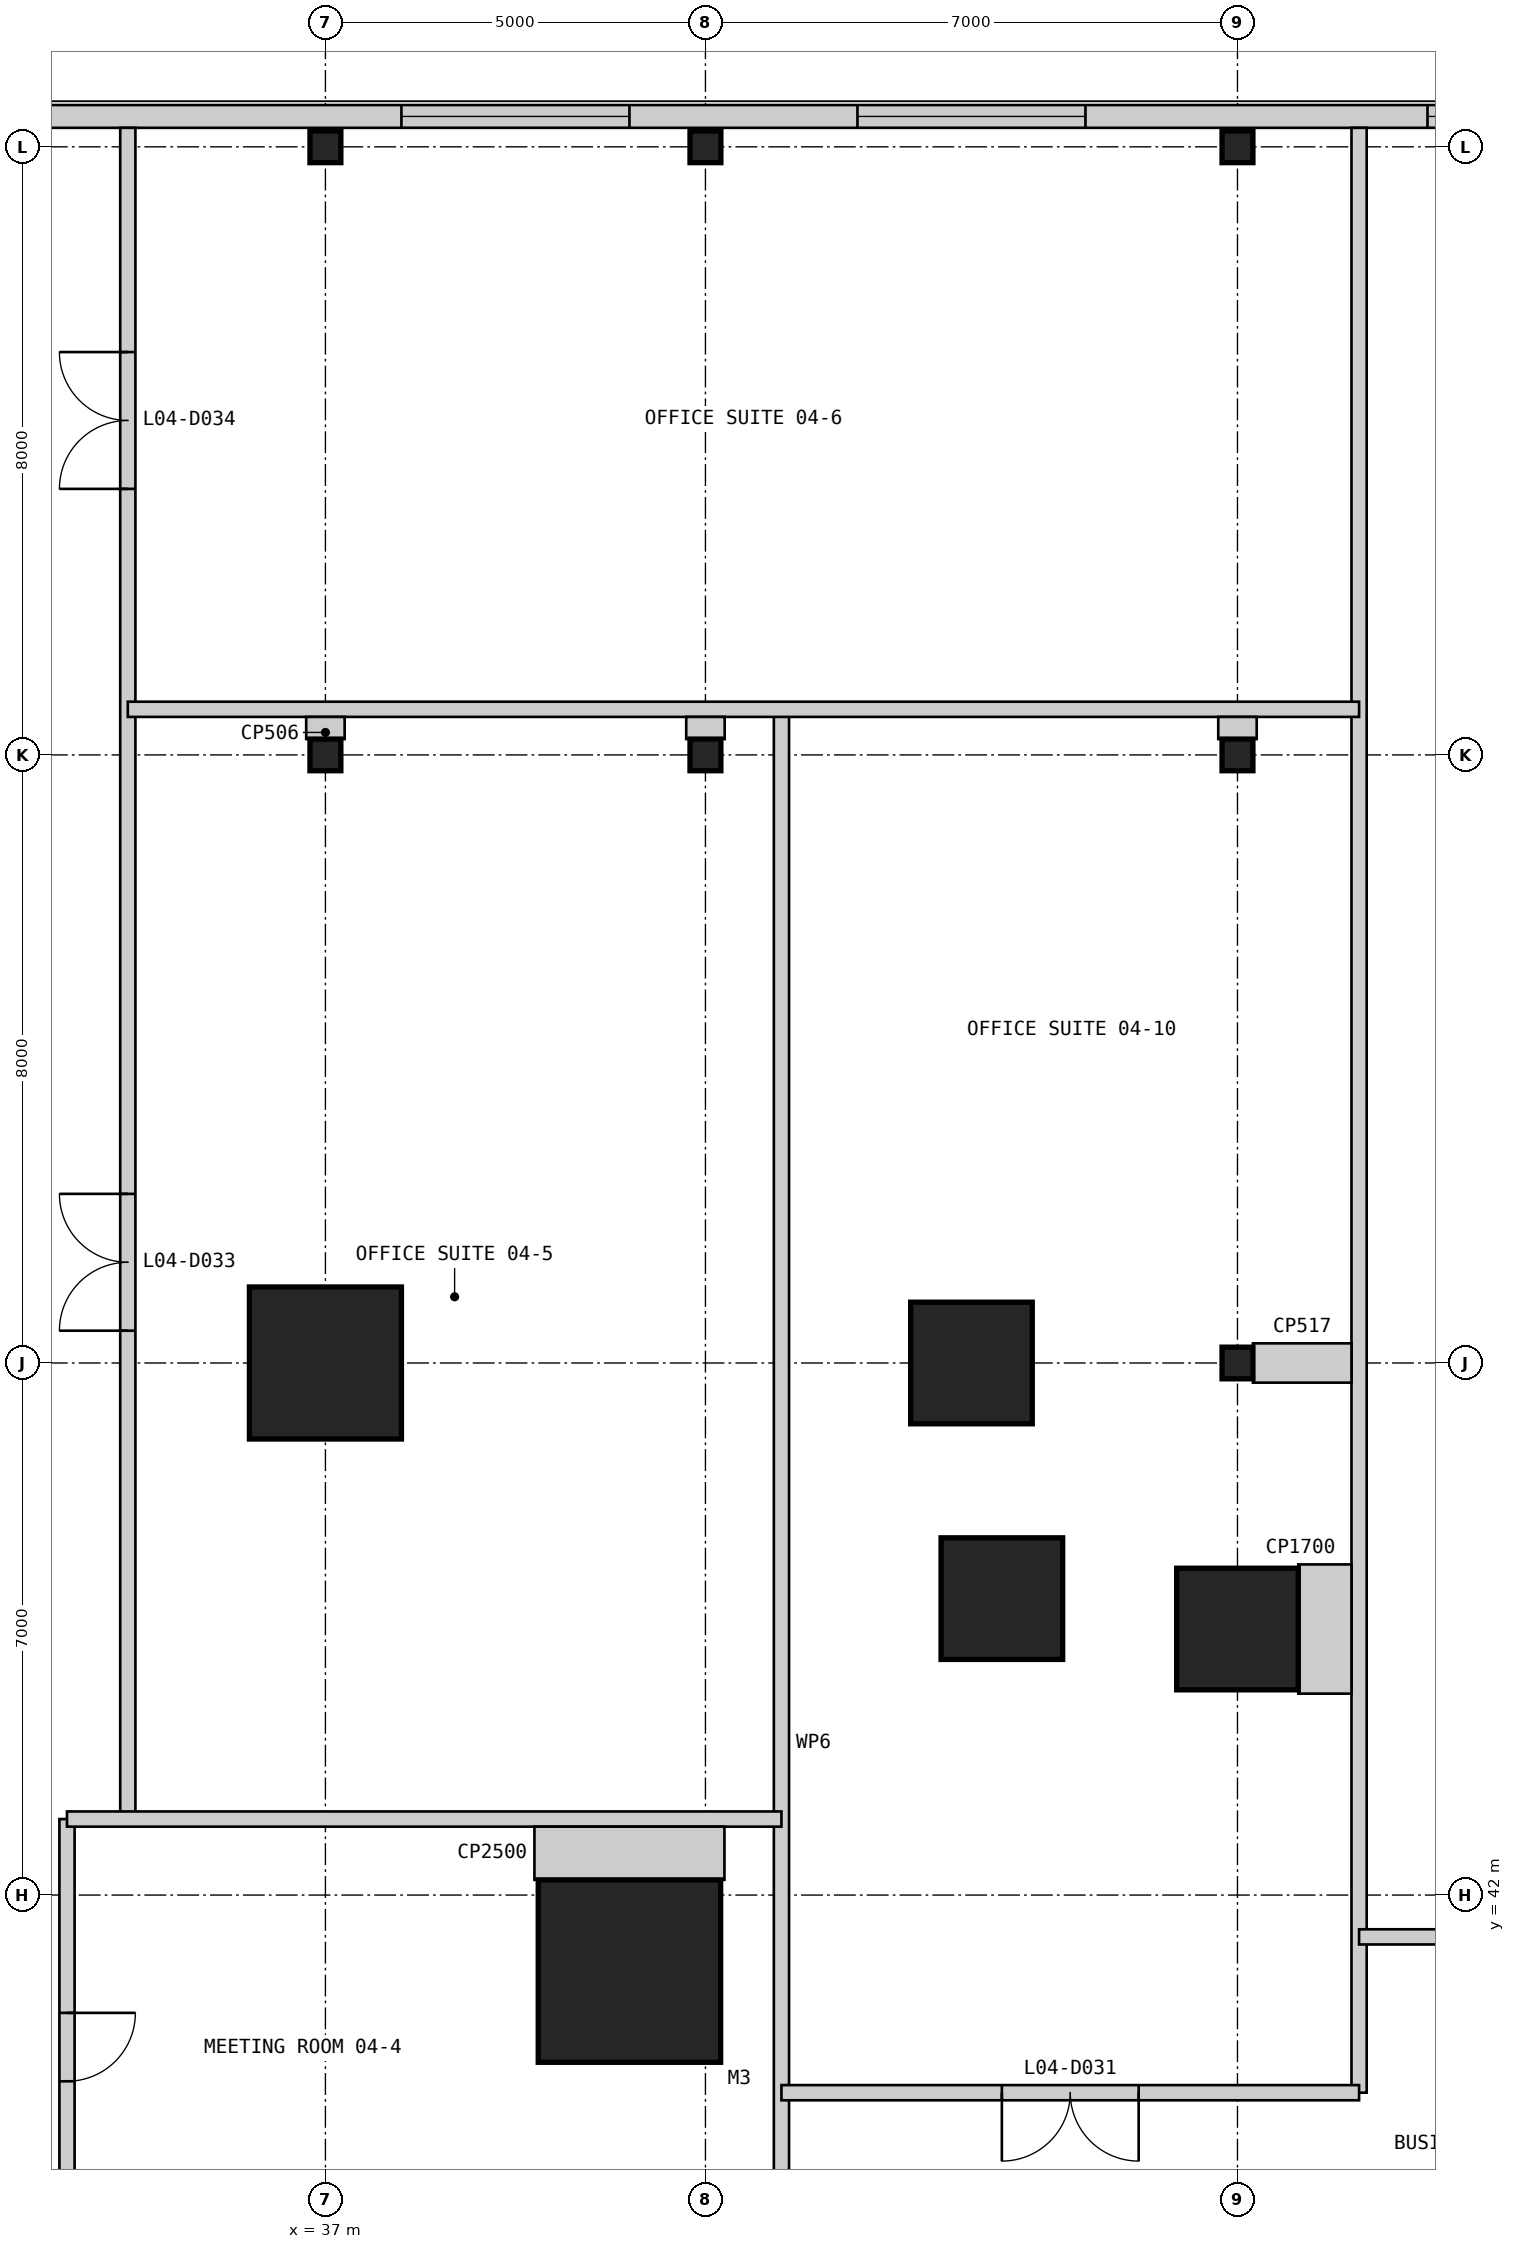
"""IFC4 building model, lengths in metres.
Left out: names, types, materials, properties, quantities, classifications, styles, units other than length and angle.
Written with IfcOpenShell. Run it as: python <this file> out.ifc"""

import sys

from ifc_helpers import new_model, si_unit, direction, frame, frame_2d, origin, origin_2d, place, context, subcontext, project, spatial, rectangle, i_section, extrude, element, fill, save


model = new_model("IFC4")
c1 = context("Model", 3, precision=1e-05, world=origin(), true_north=direction((0.0, 1.0)))
c2 = subcontext(c1, "Body", "Model", "MODEL_VIEW")
j1 = project(units=[si_unit("LENGTHUNIT", "METRE"), si_unit("PLANEANGLEUNIT", "RADIAN")], contexts=[c1])
p1 = place(None, origin())
s1 = spatial("IfcSite", under=j1, at=p1, CompositionType="ELEMENT")
p2 = place(p1, origin())
s2 = spatial("IfcBuilding", under=s1, at=p2, CompositionType="ELEMENT")
p3 = place(p2, frame((0.0, 0.0, 21.4)))
s3 = spatial("IfcBuildingStorey", under=s2, at=p3, CompositionType="ELEMENT", Elevation=21.4)
p4 = place(p3, frame((41.0, 41.0, 0.0), z_axis=(0.0, 0.0, 1.0), x_axis=(1.0, 0.0, 0.0)))
e1 = element("IfcColumn", 1, at=p4, inside=s3, PredefinedType="COLUMN", context=c2, shape_type="SweptSolid", body=[
    extrude(rectangle(XDim=2.4, YDim=2.4, at=origin_2d()), origin(), (0.0, 0.0, 1.0), 4.8),
])
for number, where, z_axis, x_axis in (
    (2, (49.0, 45.5, 0.0), (0.0, 0.0, 1.0), (1.0, 0.0, 0.0)),
    (3, (45.9, 45.9, 0.0), (0.0, 0.0, 1.0), (1.0, 0.0, 0.0)),
    (4, (45.5, 49.0, 0.0), (0.0, 0.0, 1.0), (1.0, 0.0, 0.0)),
):
    element("IfcColumn", number, at=place(p3, frame(where, z_axis=z_axis, x_axis=x_axis)), inside=s3, PredefinedType="COLUMN", context=c2, shape_type="SweptSolid", body=[
        extrude(rectangle(XDim=1.6, YDim=1.6, at=origin_2d()), origin(), (0.0, 0.0, 1.0), 4.8),
    ])
p5 = place(p3, frame((37.0, 49.0, 0.0), z_axis=(0.0, 0.0, 1.0), x_axis=(1.0, 0.0, 0.0)))
e5 = element("IfcColumn", 5, at=p5, inside=s3, PredefinedType="COLUMN", context=c2, shape_type="SweptSolid", body=[
    extrude(rectangle(XDim=2.0, YDim=2.0, at=origin_2d()), origin(), (0.0, 0.0, 1.0), 4.8),
])
for number, where, z_axis, x_axis in (
    (6, (37.0, 57.0, 0.0), (0.0, 0.0, 1.0), (1.0, 0.0, 0.0)),
    (7, (37.0, 65.0, 0.0), (0.0, 0.0, 1.0), (1.0, 0.0, 0.0)),
    (8, (42.0, 57.0, 0.0), (0.0, 0.0, 1.0), (1.0, 0.0, 0.0)),
    (9, (42.0, 65.0, 0.0), (0.0, 0.0, 1.0), (1.0, 0.0, 0.0)),
    (10, (49.0, 49.0, 0.0), (0.0, 0.0, 1.0), (1.0, 0.0, 0.0)),
    (11, (49.0, 57.0, 0.0), (0.0, 0.0, 1.0), (1.0, 0.0, 0.0)),
    (12, (49.0, 65.0, 0.0), (0.0, 0.0, 1.0), (1.0, 0.0, 0.0)),
):
    element("IfcColumn", number, at=place(p3, frame(where, z_axis=z_axis, x_axis=x_axis)), inside=s3, PredefinedType="COLUMN", context=c2, shape_type="SweptSolid", body=[
        extrude(i_section(OverallWidth=0.406, OverallDepth=0.417, WebThickness=0.03, FlangeThickness=0.048, at=origin_2d()), origin(), (0.0, 0.0, 1.0), 4.8),
    ])
p6 = place(p3, frame((57.55, 65.4, 0.0), z_axis=(0.0, 0.0, 1.0), x_axis=(-1.0, 0.0, 0.0)))
e13 = element("IfcWall", 13, at=p6, inside=s3, PredefinedType="SOLIDWALL", context=c2, shape_type="SweptSolid", body=[
    extrude(rectangle(XDim=65.1, YDim=0.3, at=frame_2d((32.55, 0.0))), origin(), (0.0, 0.0, 1.0), 4.5),
])
p7 = place(p6, frame((59.05, 0.0, 0.9)))
e14 = element("IfcOpeningElement", 14, at=p7, cuts=e13, PredefinedType="OPENING", context=c2, shape_type="SweptSolid", body=[
    extrude(rectangle(XDim=3.0, YDim=2.4, at=frame_2d((1.5, 1.2))), frame((0.0, 0.16, 0.0), z_axis=(0.0, -1.0, 0.0), x_axis=(1.0, 0.0, 0.0)), (0.0, 0.0, 1.0), 0.32),
])
p8 = place(p6, frame((51.05, 0.0, 0.9)))
e15 = element("IfcOpeningElement", 15, at=p8, cuts=e13, PredefinedType="OPENING", context=c2, shape_type="SweptSolid", body=[
    extrude(rectangle(XDim=3.0, YDim=2.4, at=frame_2d((1.5, 1.2))), frame((0.0, 0.16, 0.0), z_axis=(0.0, -1.0, 0.0), x_axis=(1.0, 0.0, 0.0)), (0.0, 0.0, 1.0), 0.32),
])
p9 = place(p6, frame((37.05, 0.0, 0.9)))
e16 = element("IfcOpeningElement", 16, at=p9, cuts=e13, PredefinedType="OPENING", context=c2, shape_type="SweptSolid", body=[
    extrude(rectangle(XDim=3.0, YDim=2.4, at=frame_2d((1.5, 1.2))), frame((0.0, 0.16, 0.0), z_axis=(0.0, -1.0, 0.0), x_axis=(1.0, 0.0, 0.0)), (0.0, 0.0, 1.0), 0.32),
])
p10 = place(p6, frame((25.05, 0.0, 0.9)))
e17 = element("IfcOpeningElement", 17, at=p10, cuts=e13, PredefinedType="OPENING", context=c2, shape_type="SweptSolid", body=[
    extrude(rectangle(XDim=3.0, YDim=2.4, at=frame_2d((1.5, 1.2))), frame((0.0, 0.16, 0.0), z_axis=(0.0, -1.0, 0.0), x_axis=(1.0, 0.0, 0.0)), (0.0, 0.0, 1.0), 0.32),
])
p11 = place(p6, frame((16.55, 0.0, 0.9)))
e18 = element("IfcOpeningElement", 18, at=p11, cuts=e13, PredefinedType="OPENING", context=c2, shape_type="SweptSolid", body=[
    extrude(rectangle(XDim=3.0, YDim=2.4, at=frame_2d((1.5, 1.2))), frame((0.0, 0.16, 0.0), z_axis=(0.0, -1.0, 0.0), x_axis=(1.0, 0.0, 0.0)), (0.0, 0.0, 1.0), 0.32),
])
p12 = place(p6, frame((10.55, 0.0, 0.9)))
e19 = element("IfcOpeningElement", 19, at=p12, cuts=e13, PredefinedType="OPENING", context=c2, shape_type="SweptSolid", body=[
    extrude(rectangle(XDim=3.0, YDim=2.4, at=frame_2d((1.5, 1.2))), frame((0.0, 0.16, 0.0), z_axis=(0.0, -1.0, 0.0), x_axis=(1.0, 0.0, 0.0)), (0.0, 0.0, 1.0), 0.32),
])
p13 = place(p6, frame((3.05, 0.0, 0.9)))
e20 = element("IfcOpeningElement", 20, at=p13, cuts=e13, PredefinedType="OPENING", context=c2, shape_type="SweptSolid", body=[
    extrude(rectangle(XDim=3.0, YDim=2.4, at=frame_2d((1.5, 1.2))), frame((0.0, 0.16, 0.0), z_axis=(0.0, -1.0, 0.0), x_axis=(1.0, 0.0, 0.0)), (0.0, 0.0, 1.0), 0.32),
])
p14 = place(p3, frame((33.6, 37.0, 0.0), z_axis=(0.0, 0.0, 1.0), x_axis=(0.0, 1.0, 0.0)))
e21 = element("IfcWall", 21, at=p14, inside=s3, PredefinedType="PARTITIONING", context=c2, shape_type="SweptSolid", body=[
    extrude(rectangle(XDim=6.0, YDim=0.2, at=frame_2d((3.0, 0.0))), origin(), (0.0, 0.0, 1.0), 4.5),
])
p15 = place(p14, frame((2.55, 0.0, 0.0)))
e22 = element("IfcOpeningElement", 22, at=p15, cuts=e21, PredefinedType="OPENING", context=c2, shape_type="SweptSolid", body=[
    extrude(rectangle(XDim=0.9, YDim=2.2, at=frame_2d((0.45, 1.1))), frame((0.0, 0.11, 0.0), z_axis=(0.0, -1.0, 0.0), x_axis=(1.0, 0.0, 0.0)), (0.0, 0.0, 1.0), 0.22),
])
p16 = place(p3, frame((34.4, 43.0, 0.0), z_axis=(0.0, 0.0, 1.0), x_axis=(0.0, 1.0, 0.0)))
e23 = element("IfcWall", 23, at=p16, inside=s3, PredefinedType="PARTITIONING", context=c2, shape_type="SweptSolid", body=[
    extrude(rectangle(XDim=22.25, YDim=0.2, at=frame_2d((11.125, 0.0))), origin(), (0.0, 0.0, 1.0), 4.5),
])
p17 = place(p16, frame((6.425, 0.0, 0.0)))
e24 = element("IfcOpeningElement", 24, at=p17, cuts=e23, PredefinedType="OPENING", context=c2, shape_type="SweptSolid", body=[
    extrude(rectangle(XDim=1.8, YDim=2.4, at=frame_2d((0.9, 1.2))), frame((0.0, 0.11, 0.0), z_axis=(0.0, -1.0, 0.0), x_axis=(1.0, 0.0, 0.0)), (0.0, 0.0, 1.0), 0.22),
])
p18 = place(p16, frame((17.5, 0.0, 0.0)))
e25 = element("IfcOpeningElement", 25, at=p18, cuts=e23, PredefinedType="OPENING", context=c2, shape_type="SweptSolid", body=[
    extrude(rectangle(XDim=1.8, YDim=2.4, at=frame_2d((0.9, 1.2))), frame((0.0, 0.11, 0.0), z_axis=(0.0, -1.0, 0.0), x_axis=(1.0, 0.0, 0.0)), (0.0, 0.0, 1.0), 0.22),
])
p19 = place(p3, frame((43.0, 30.4, 0.0), z_axis=(0.0, 0.0, 1.0), x_axis=(0.0, 1.0, 0.0)))
e26 = element("IfcWall", 26, at=p19, inside=s3, PredefinedType="PARTITIONING", context=c2, shape_type="SweptSolid", body=[
    extrude(rectangle(XDim=27.2, YDim=0.2, at=frame_2d((13.6, 0.0))), origin(), (0.0, 0.0, 1.0), 3.843),
])
p20 = place(p3, frame((50.6, 39.4, 0.0), z_axis=(0.0, 0.0, 1.0), x_axis=(0.0, 1.0, 0.0)))
e27 = element("IfcWall", 27, at=p20, inside=s3, PredefinedType="PARTITIONING", context=c2, shape_type="SweptSolid", body=[
    extrude(rectangle(XDim=25.85, YDim=0.2, at=frame_2d((12.925, 0.0))), origin(), (0.0, 0.0, 1.0), 4.5),
])
p21 = place(p3, frame((43.0, 39.4, 0.0), z_axis=(0.0, 0.0, 1.0), x_axis=(1.0, 0.0, 0.0)))
e28 = element("IfcWall", 28, at=p21, inside=s3, PredefinedType="PARTITIONING", context=c2, shape_type="SweptSolid", body=[
    extrude(rectangle(XDim=7.6, YDim=0.2, at=frame_2d((3.8, 0.0))), origin(), (0.0, 0.0, 1.0), 4.5),
])
p22 = place(p21, frame((2.9, 0.0, 0.0)))
e29 = element("IfcOpeningElement", 29, at=p22, cuts=e28, PredefinedType="OPENING", context=c2, shape_type="SweptSolid", body=[
    extrude(rectangle(XDim=1.8, YDim=2.4, at=frame_2d((0.9, 1.2))), frame((0.0, 0.11, 0.0), z_axis=(0.0, -1.0, 0.0), x_axis=(1.0, 0.0, 0.0)), (0.0, 0.0, 1.0), 0.22),
])
p23 = place(p3, frame((50.6, 41.45, 0.0), z_axis=(0.0, 0.0, 1.0), x_axis=(1.0, 0.0, 0.0)))
e30 = element("IfcWall", 30, at=p23, inside=s3, PredefinedType="PARTITIONING", context=c2, shape_type="SweptSolid", body=[
    extrude(rectangle(XDim=6.65, YDim=0.2, at=frame_2d((3.325, 0.0))), origin(), (0.0, 0.0, 1.0), 4.5),
])
p24 = place(p23, frame((2.425, 0.0, 0.0)))
e31 = element("IfcOpeningElement", 31, at=p24, cuts=e30, PredefinedType="OPENING", context=c2, shape_type="SweptSolid", body=[
    extrude(rectangle(XDim=1.8, YDim=2.4, at=frame_2d((0.9, 1.2))), frame((0.0, 0.11, 0.0), z_axis=(0.0, -1.0, 0.0), x_axis=(1.0, 0.0, 0.0)), (0.0, 0.0, 1.0), 0.22),
])
p25 = place(p3, frame((33.6, 43.0, 0.0), z_axis=(0.0, 0.0, 1.0), x_axis=(1.0, 0.0, 0.0)))
e32 = element("IfcWall", 32, at=p25, inside=s3, PredefinedType="PARTITIONING", context=c2, shape_type="SweptSolid", body=[
    extrude(rectangle(XDim=9.4, YDim=0.2, at=frame_2d((4.7, 0.0))), origin(), (0.0, 0.0, 1.0), 4.5),
])
p26 = place(p3, frame((34.4, 57.6, 0.0), z_axis=(0.0, 0.0, 1.0), x_axis=(1.0, 0.0, 0.0)))
e33 = element("IfcWall", 33, at=p26, inside=s3, PredefinedType="PARTITIONING", context=c2, shape_type="SweptSolid", body=[
    extrude(rectangle(XDim=16.2, YDim=0.2, at=frame_2d((8.1, 0.0))), origin(), (0.0, 0.0, 1.0), 4.5),
])
p27 = place(p3, frame((50.5, 45.5, 0.0), z_axis=(0.0, 0.0, 1.0), x_axis=(-1.0, 0.0, 0.0)))
e34 = element("IfcWall", 34, at=p27, inside=s3, PredefinedType="PARTITIONING", context=c2, shape_type="SweptSolid", body=[
    extrude(rectangle(XDim=0.7, YDim=1.7, at=frame_2d((0.35, 0.0))), origin(), (0.0, 0.0, 1.0), 4.5),
])
p28 = place(p3, frame((50.5, 49.0, 0.0), z_axis=(0.0, 0.0, 1.0), x_axis=(-1.0, 0.0, 0.0)))
e35 = element("IfcWall", 35, at=p28, inside=s3, PredefinedType="PARTITIONING", context=c2, shape_type="SweptSolid", body=[
    extrude(rectangle(XDim=1.297, YDim=0.517, at=frame_2d((0.648, 0.0))), origin(), (0.0, 0.0, 1.0), 3.754),
])
for number, where, z_axis, x_axis in (
    (36, (49.0, 57.5, 0.0), (0.0, 0.0, 1.0), (0.0, -1.0, 0.0)),
    (37, (37.0, 57.5, 0.0), (0.0, 0.0, 1.0), (0.0, -1.0, 0.0)),
    (38, (42.0, 57.5, 0.0), (0.0, 0.0, 1.0), (0.0, -1.0, 0.0)),
):
    element("IfcWall", number, at=place(p3, frame(where, z_axis=z_axis, x_axis=x_axis)), inside=s3, PredefinedType="PARTITIONING", context=c2, shape_type="SweptSolid", body=[
        extrude(rectangle(XDim=0.292, YDim=0.506, at=frame_2d((0.146, 0.0))), origin(), (0.0, 0.0, 1.0), 4.5),
    ])
p29 = place(p3, frame((41.0, 42.9, 0.0), z_axis=(0.0, 0.0, 1.0), x_axis=(0.0, -1.0, 0.0)))
e39 = element("IfcWall", 39, at=p29, inside=s3, PredefinedType="PARTITIONING", context=c2, shape_type="SweptSolid", body=[
    extrude(rectangle(XDim=0.7, YDim=2.5, at=frame_2d((0.35, 0.0))), origin(), (0.0, 0.0, 1.0), 4.5),
])
p30 = place(p11, origin())
e40 = element("IfcWindow", 40, at=p30, inside=s3, PartitioningType="SINGLE_PANEL", PredefinedType="WINDOW", context=c2, shape_type="SweptSolid", body=[
    extrude(rectangle(XDim=3.0, YDim=2.4, at=frame_2d((1.5, 1.2))), frame((0.0, 0.03, 0.0), z_axis=(0.0, -1.0, 0.0), x_axis=(1.0, 0.0, 0.0)), (0.0, 0.0, 1.0), 0.06),
])
fill(e18, e40)
p31 = place(p12, origin())
e41 = element("IfcWindow", 41, at=p31, inside=s3, PartitioningType="SINGLE_PANEL", PredefinedType="WINDOW", context=c2, shape_type="SweptSolid", body=[
    extrude(rectangle(XDim=3.0, YDim=2.4, at=frame_2d((1.5, 1.2))), frame((0.0, 0.03, 0.0), z_axis=(0.0, -1.0, 0.0), x_axis=(1.0, 0.0, 0.0)), (0.0, 0.0, 1.0), 0.06),
])
fill(e19, e41)
p32 = place(p13, origin())
e42 = element("IfcWindow", 42, at=p32, inside=s3, PartitioningType="SINGLE_PANEL", PredefinedType="WINDOW", context=c2, shape_type="SweptSolid", body=[
    extrude(rectangle(XDim=3.0, YDim=2.4, at=frame_2d((1.5, 1.2))), frame((0.0, 0.03, 0.0), z_axis=(0.0, -1.0, 0.0), x_axis=(1.0, 0.0, 0.0)), (0.0, 0.0, 1.0), 0.06),
])
fill(e20, e42)
p33 = place(p22, frame((1.8, 0.0, 0.0), z_axis=(0.0, 0.0, 1.0), x_axis=(-1.0, 0.0, 0.0)))
e43 = element("IfcDoor", 43, at=p33, inside=s3, OperationType="DOUBLE_DOOR_SINGLE_SWING", PredefinedType="DOOR", context=c2, shape_type="SweptSolid", body=[
    extrude(rectangle(XDim=1.8, YDim=2.4, at=frame_2d((0.9, 1.2))), frame((0.0, 0.025, 0.0), z_axis=(0.0, -1.0, 0.0), x_axis=(1.0, 0.0, 0.0)), (0.0, 0.0, 1.0), 0.05),
])
fill(e29, e43)
p34 = place(p17, origin())
e44 = element("IfcDoor", 44, at=p34, inside=s3, OperationType="DOUBLE_DOOR_SINGLE_SWING", PredefinedType="DOOR", context=c2, shape_type="SweptSolid", body=[
    extrude(rectangle(XDim=1.8, YDim=2.4, at=frame_2d((0.9, 1.2))), frame((0.0, 0.025, 0.0), z_axis=(0.0, -1.0, 0.0), x_axis=(1.0, 0.0, 0.0)), (0.0, 0.0, 1.0), 0.05),
])
fill(e24, e44)
p35 = place(p18, origin())
e45 = element("IfcDoor", 45, at=p35, inside=s3, OperationType="DOUBLE_DOOR_SINGLE_SWING", PredefinedType="DOOR", context=c2, shape_type="SweptSolid", body=[
    extrude(rectangle(XDim=1.8, YDim=2.4, at=frame_2d((0.9, 1.2))), frame((0.0, 0.025, 0.0), z_axis=(0.0, -1.0, 0.0), x_axis=(1.0, 0.0, 0.0)), (0.0, 0.0, 1.0), 0.05),
])
fill(e25, e45)
p36 = place(p15, frame((0.9, 0.0, 0.0), z_axis=(0.0, 0.0, 1.0), x_axis=(-1.0, 0.0, 0.0)))
e46 = element("IfcDoor", 46, at=p36, inside=s3, OperationType="SINGLE_SWING_LEFT", PredefinedType="DOOR", context=c2, shape_type="SweptSolid", body=[
    extrude(rectangle(XDim=0.9, YDim=2.2, at=frame_2d((0.45, 1.1))), frame((0.0, 0.025, 0.0), z_axis=(0.0, -1.0, 0.0), x_axis=(1.0, 0.0, 0.0)), (0.0, 0.0, 1.0), 0.05),
])
fill(e22, e46)
save(model, sys.argv[1])
